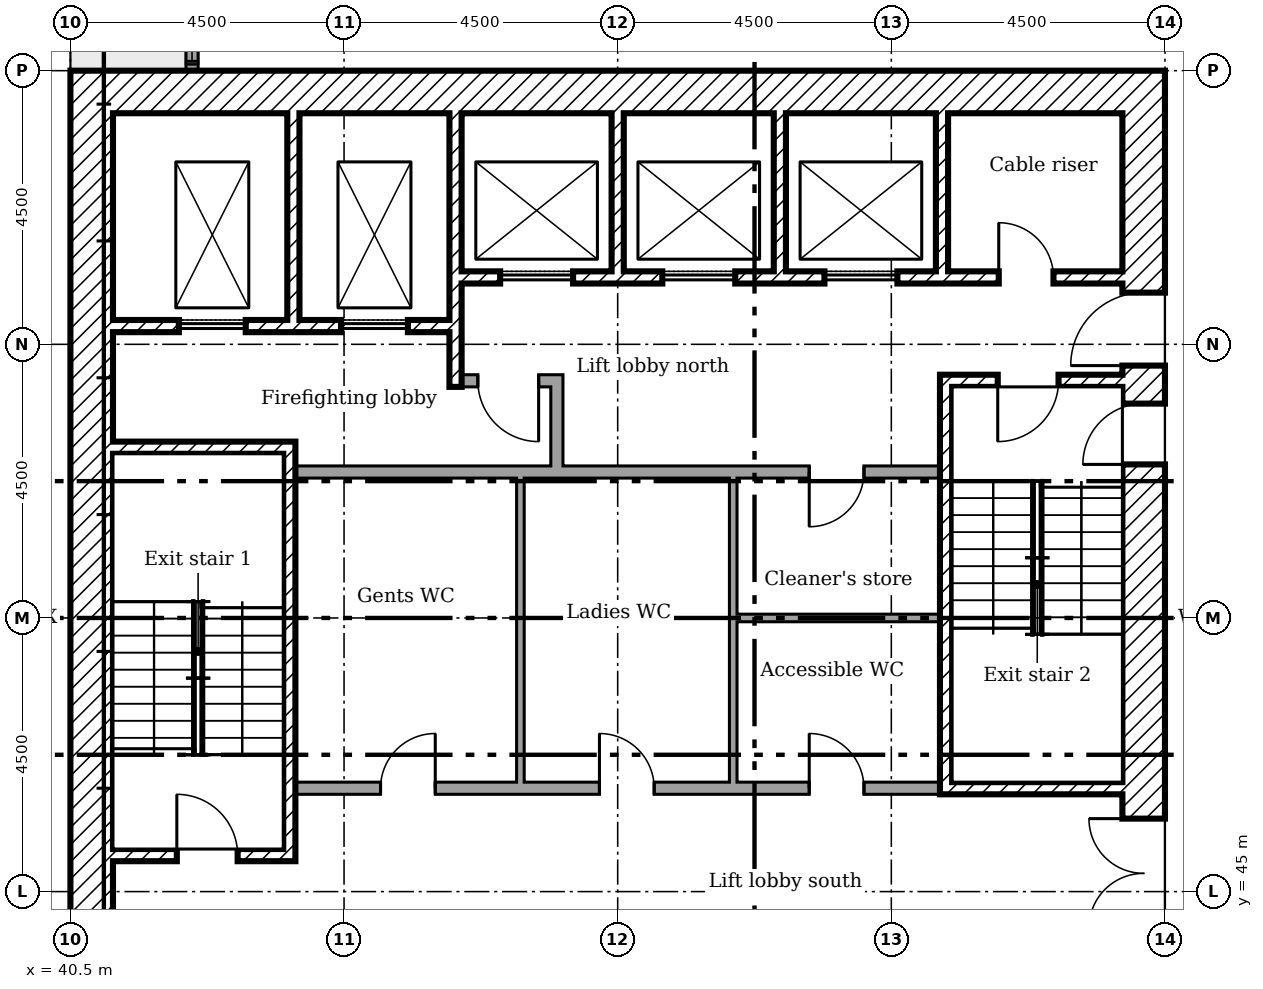
"""IFC4 building model, lengths in metres.
Left out: names, types, materials, properties, quantities, classifications, styles, units other than length and angle.
Written with IfcOpenShell. Run it as: python <this file> out.ifc"""

import sys

from ifc_helpers import new_model, si_unit, direction, frame, frame_2d, origin, place, context, subcontext, project, spatial, rectangle, extrude, element, fill, save


model = new_model("IFC4")
c1 = context("Model", 3, precision=1e-05, world=origin(), true_north=direction((0.0, 1.0)))
c2 = subcontext(c1, "Body", "Model", "MODEL_VIEW")
j1 = project(units=[si_unit("LENGTHUNIT", "METRE"), si_unit("PLANEANGLEUNIT", "RADIAN")], contexts=[c1])
p1 = place(None, origin())
s1 = spatial("IfcSite", under=j1, at=p1, CompositionType="ELEMENT")
p2 = place(p1, origin())
s2 = spatial("IfcBuilding", under=s1, at=p2, CompositionType="ELEMENT")
p3 = place(p2, frame((0.0, 0.0, 138.8)))
s3 = spatial("IfcBuildingStorey", under=s2, at=p3, CompositionType="ELEMENT", Elevation=138.8)
p4 = place(p3, frame((42.5, 69.9, 0.0), z_axis=(0.0, 0.0, 1.0), x_axis=(0.0, -1.0, 0.0)))
e1 = element("IfcWall", 1, at=p4, inside=s3, PredefinedType="ELEMENTEDWALL", context=c2, shape_type="SweptSolid", body=[
    extrude(rectangle(XDim=11.4, YDim=0.2, at=frame_2d((5.7, 0.0))), origin(), (0.0, 0.0, 1.0), 1.8),
])
p5 = place(p3, frame((58.15, 40.5, 0.0), z_axis=(0.0, 0.0, 1.0), x_axis=(0.0, 1.0, 0.0)))
e2 = element("IfcWall", 2, at=p5, inside=s3, PredefinedType="SHEAR", context=c2, shape_type="SweptSolid", body=[
    extrude(rectangle(XDim=18.0, YDim=0.7, at=frame_2d((9.0, 0.0))), origin(), (0.0, 0.0, 1.0), 4.75),
])
p6 = place(p5, frame((13.15, 0.0, 0.0)))
e3 = element("IfcOpeningElement", 3, at=p6, cuts=e2, PredefinedType="OPENING", context=c2, shape_type="SweptSolid", body=[
    extrude(rectangle(XDim=1.2, YDim=2.1, at=frame_2d((0.6, 1.05))), frame((0.0, 0.36, 0.0), z_axis=(0.0, -1.0, 0.0), x_axis=(1.0, 0.0, 0.0)), (0.0, 0.0, 1.0), 0.72),
])
p7 = place(p5, frame((3.9, 0.0, 0.0)))
e4 = element("IfcOpeningElement", 4, at=p7, cuts=e2, PredefinedType="OPENING", context=c2, shape_type="SweptSolid", body=[
    extrude(rectangle(XDim=1.8, YDim=2.1, at=frame_2d((0.9, 1.05))), frame((0.0, 0.36, 0.0), z_axis=(0.0, -1.0, 0.0), x_axis=(1.0, 0.0, 0.0)), (0.0, 0.0, 1.0), 0.72),
])
p8 = place(p5, frame((11.525, 0.0, 0.0)))
e5 = element("IfcOpeningElement", 5, at=p8, cuts=e2, PredefinedType="OPENING", context=c2, shape_type="SweptSolid", body=[
    extrude(rectangle(XDim=1.0, YDim=2.1, at=frame_2d((0.5, 1.05))), frame((0.0, 0.36, 0.0), z_axis=(0.0, -1.0, 0.0), x_axis=(1.0, 0.0, 0.0)), (0.0, 0.0, 1.0), 0.72),
])
p9 = place(p3, frame((41.2, 58.15, 0.0)))
e6 = element("IfcWall", 6, at=p9, inside=s3, PredefinedType="SHEAR", context=c2, shape_type="SweptSolid", body=[
    extrude(rectangle(XDim=16.6, YDim=0.7, at=frame_2d((8.3, 0.0))), origin(), (0.0, 0.0, 1.0), 4.75),
])
p10 = place(p3, frame((40.85, 40.5, 0.0), z_axis=(0.0, 0.0, 1.0), x_axis=(0.0, 1.0, 0.0)))
e7 = element("IfcWall", 7, at=p10, inside=s3, PredefinedType="SHEAR", context=c2, shape_type="SweptSolid", body=[
    extrude(rectangle(XDim=18.0, YDim=0.7, at=frame_2d((9.0, 0.0))), origin(), (0.0, 0.0, 1.0), 4.75),
])
p11 = place(p3, frame((44.167, 57.8, 0.0), z_axis=(0.0, 0.0, 1.0), x_axis=(0.0, -1.0, 0.0)))
e8 = element("IfcWall", 8, at=p11, inside=s3, PredefinedType="SHEAR", context=c2, shape_type="SweptSolid", body=[
    extrude(rectangle(XDim=3.4, YDim=0.2, at=frame_2d((1.7, 0.0))), origin(), (0.0, 0.0, 1.0), 4.75),
])
p12 = place(p3, frame((46.833, 57.8, 0.0), z_axis=(0.0, 0.0, 1.0), x_axis=(0.0, -1.0, 0.0)))
e9 = element("IfcWall", 9, at=p12, inside=s3, PredefinedType="SHEAR", context=c2, shape_type="SweptSolid", body=[
    extrude(rectangle(XDim=4.5, YDim=0.2, at=frame_2d((2.25, 0.0))), origin(), (0.0, 0.0, 1.0), 4.75),
])
for number, where, z_axis, x_axis in (
    (10, (49.5, 57.8, 0.0), (0.0, 0.0, 1.0), (0.0, -1.0, 0.0)),
    (11, (52.167, 57.8, 0.0), (0.0, 0.0, 1.0), (0.0, -1.0, 0.0)),
    (12, (54.833, 57.8, 0.0), (0.0, 0.0, 1.0), (0.0, -1.0, 0.0)),
):
    element("IfcWall", number, at=place(p3, frame(where, z_axis=z_axis, x_axis=x_axis)), inside=s3, PredefinedType="SHEAR", context=c2, shape_type="SweptSolid", body=[
        extrude(rectangle(XDim=2.6, YDim=0.2, at=frame_2d((1.3, 0.0))), origin(), (0.0, 0.0, 1.0), 4.75),
    ])
p13 = place(p3, frame((48.5, 51.9, 0.0), z_axis=(0.0, 0.0, 1.0), x_axis=(0.0, 1.0, 0.0)))
e13 = element("IfcWall", 13, at=p13, inside=s3, PredefinedType="PARTITIONING", context=c2, shape_type="SweptSolid", body=[
    extrude(rectangle(XDim=1.6, YDim=0.2, at=frame_2d((0.8, 0.0))), origin(), (0.0, 0.0, 1.0), 4.75),
])
p14 = place(p3, frame((46.933, 53.4, 0.0)))
e14 = element("IfcWall", 14, at=p14, inside=s3, PredefinedType="PARTITIONING", context=c2, shape_type="SweptSolid", body=[
    extrude(rectangle(XDim=1.467, YDim=0.2, at=frame_2d((0.733, 0.0))), origin(), (0.0, 0.0, 1.0), 4.75),
])
p15 = place(p14, frame((0.267, 0.0, 0.0)))
e15 = element("IfcOpeningElement", 15, at=p15, cuts=e14, PredefinedType="OPENING", context=c2, shape_type="SweptSolid", body=[
    extrude(rectangle(XDim=1.0, YDim=2.1, at=frame_2d((0.5, 1.05))), frame((0.0, 0.11, 0.0), z_axis=(0.0, -1.0, 0.0), x_axis=(1.0, 0.0, 0.0)), (0.0, 0.0, 1.0), 0.22),
])
p16 = place(p3, frame((46.933, 55.1, 0.0)))
e16 = element("IfcWall", 16, at=p16, inside=s3, PredefinedType="SHEAR", context=c2, shape_type="SweptSolid", body=[
    extrude(rectangle(XDim=10.867, YDim=0.2, at=frame_2d((5.433, 0.0))), origin(), (0.0, 0.0, 1.0), 4.75),
])
p17 = place(p16, frame((8.833, 0.0, 0.0)))
e17 = element("IfcOpeningElement", 17, at=p17, cuts=e16, PredefinedType="OPENING", context=c2, shape_type="SweptSolid", body=[
    extrude(rectangle(XDim=0.9, YDim=2.1, at=frame_2d((0.45, 1.05))), frame((0.0, 0.11, 0.0), z_axis=(0.0, -1.0, 0.0), x_axis=(1.0, 0.0, 0.0)), (0.0, 0.0, 1.0), 0.22),
])
p18 = place(p16, frame((0.633, 0.0, 0.0)))
e18 = element("IfcOpeningElement", 18, at=p18, cuts=e16, PredefinedType="OPENING", context=c2, shape_type="SweptSolid", body=[
    extrude(rectangle(XDim=1.2, YDim=2.1, at=frame_2d((0.6, 1.05))), frame((0.0, 0.11, 0.0), z_axis=(0.0, -1.0, 0.0), x_axis=(1.0, 0.0, 0.0)), (0.0, 0.0, 1.0), 0.22),
])
p19 = place(p16, frame((3.3, 0.0, 0.0)))
e19 = element("IfcOpeningElement", 19, at=p19, cuts=e16, PredefinedType="OPENING", context=c2, shape_type="SweptSolid", body=[
    extrude(rectangle(XDim=1.2, YDim=2.1, at=frame_2d((0.6, 1.05))), frame((0.0, 0.11, 0.0), z_axis=(0.0, -1.0, 0.0), x_axis=(1.0, 0.0, 0.0)), (0.0, 0.0, 1.0), 0.22),
])
p20 = place(p16, frame((5.967, 0.0, 0.0)))
e20 = element("IfcOpeningElement", 20, at=p20, cuts=e16, PredefinedType="OPENING", context=c2, shape_type="SweptSolid", body=[
    extrude(rectangle(XDim=1.2, YDim=2.1, at=frame_2d((0.6, 1.05))), frame((0.0, 0.11, 0.0), z_axis=(0.0, -1.0, 0.0), x_axis=(1.0, 0.0, 0.0)), (0.0, 0.0, 1.0), 0.22),
])
p21 = place(p3, frame((41.2, 54.3, 0.0)))
e21 = element("IfcWall", 21, at=p21, inside=s3, PredefinedType="SHEAR", context=c2, shape_type="SweptSolid", body=[
    extrude(rectangle(XDim=5.533, YDim=0.2, at=frame_2d((2.767, 0.0))), origin(), (0.0, 0.0, 1.0), 4.75),
])
p22 = place(p21, frame((1.083, 0.0, 0.0)))
e22 = element("IfcOpeningElement", 22, at=p22, cuts=e21, PredefinedType="OPENING", context=c2, shape_type="SweptSolid", body=[
    extrude(rectangle(XDim=1.1, YDim=2.1, at=frame_2d((0.55, 1.05))), frame((0.0, 0.11, 0.0), z_axis=(0.0, -1.0, 0.0), x_axis=(1.0, 0.0, 0.0)), (0.0, 0.0, 1.0), 0.22),
])
p23 = place(p21, frame((3.75, 0.0, 0.0)))
e23 = element("IfcOpeningElement", 23, at=p23, cuts=e21, PredefinedType="OPENING", context=c2, shape_type="SweptSolid", body=[
    extrude(rectangle(XDim=1.1, YDim=2.1, at=frame_2d((0.55, 1.05))), frame((0.0, 0.11, 0.0), z_axis=(0.0, -1.0, 0.0), x_axis=(1.0, 0.0, 0.0)), (0.0, 0.0, 1.0), 0.22),
])
p24 = place(p3, frame((44.1, 45.5, 0.0), z_axis=(0.0, 0.0, 1.0), x_axis=(0.0, 1.0, 0.0)))
e24 = element("IfcWall", 24, at=p24, inside=s3, PredefinedType="SHEAR", context=c2, shape_type="SweptSolid", body=[
    extrude(rectangle(XDim=6.9, YDim=0.2, at=frame_2d((3.45, 0.0))), origin(), (0.0, 0.0, 1.0), 4.75),
])
p25 = place(p3, frame((41.2, 52.3, 0.0)))
e25 = element("IfcWall", 25, at=p25, inside=s3, PredefinedType="SHEAR", context=c2, shape_type="SweptSolid", body=[
    extrude(rectangle(XDim=2.8, YDim=0.2, at=frame_2d((1.4, 0.0))), origin(), (0.0, 0.0, 1.0), 4.75),
])
p26 = place(p3, frame((41.2, 45.6, 0.0)))
e26 = element("IfcWall", 26, at=p26, inside=s3, PredefinedType="SHEAR", context=c2, shape_type="SweptSolid", body=[
    extrude(rectangle(XDim=2.8, YDim=0.2, at=frame_2d((1.4, 0.0))), origin(), (0.0, 0.0, 1.0), 4.75),
])
p27 = place(p26, frame((1.05, 0.0, 0.0)))
e27 = element("IfcOpeningElement", 27, at=p27, cuts=e26, PredefinedType="OPENING", context=c2, shape_type="SweptSolid", body=[
    extrude(rectangle(XDim=1.0, YDim=2.1, at=frame_2d((0.5, 1.05))), frame((0.0, 0.11, 0.0), z_axis=(0.0, -1.0, 0.0), x_axis=(1.0, 0.0, 0.0)), (0.0, 0.0, 1.0), 0.22),
])
p28 = place(p3, frame((54.8, 53.4, 0.0)))
e28 = element("IfcWall", 28, at=p28, inside=s3, PredefinedType="SHEAR", context=c2, shape_type="SweptSolid", body=[
    extrude(rectangle(XDim=3.0, YDim=0.2, at=frame_2d((1.5, 0.0))), origin(), (0.0, 0.0, 1.0), 4.75),
])
p29 = place(p28, frame((0.95, 0.0, 0.0)))
e29 = element("IfcOpeningElement", 29, at=p29, cuts=e28, PredefinedType="OPENING", context=c2, shape_type="SweptSolid", body=[
    extrude(rectangle(XDim=1.0, YDim=2.1, at=frame_2d((0.5, 1.05))), frame((0.0, 0.11, 0.0), z_axis=(0.0, -1.0, 0.0), x_axis=(1.0, 0.0, 0.0)), (0.0, 0.0, 1.0), 0.22),
])
p30 = place(p3, frame((54.8, 46.7, 0.0)))
e30 = element("IfcWall", 30, at=p30, inside=s3, PredefinedType="SHEAR", context=c2, shape_type="SweptSolid", body=[
    extrude(rectangle(XDim=3.0, YDim=0.2, at=frame_2d((1.5, 0.0))), origin(), (0.0, 0.0, 1.0), 4.75),
])
p31 = place(p3, frame((54.9, 46.8, 0.0), z_axis=(0.0, 0.0, 1.0), x_axis=(0.0, 1.0, 0.0)))
e31 = element("IfcWall", 31, at=p31, inside=s3, PredefinedType="SHEAR", context=c2, shape_type="SweptSolid", body=[
    extrude(rectangle(XDim=6.5, YDim=0.2, at=frame_2d((3.25, 0.0))), origin(), (0.0, 0.0, 1.0), 4.75),
])
p32 = place(p3, frame((44.2, 51.9, 0.0)))
e32 = element("IfcWall", 32, at=p32, inside=s3, PredefinedType="PARTITIONING", context=c2, shape_type="SweptSolid", body=[
    extrude(rectangle(XDim=10.6, YDim=0.2, at=frame_2d((5.3, 0.0))), origin(), (0.0, 0.0, 1.0), 4.75),
])
p33 = place(p32, frame((8.45, 0.0, 0.0)))
e33 = element("IfcOpeningElement", 33, at=p33, cuts=e32, PredefinedType="OPENING", context=c2, shape_type="SweptSolid", body=[
    extrude(rectangle(XDim=0.9, YDim=2.1, at=frame_2d((0.45, 1.05))), frame((0.0, 0.11, 0.0), z_axis=(0.0, -1.0, 0.0), x_axis=(1.0, 0.0, 0.0)), (0.0, 0.0, 1.0), 0.22),
])
p34 = place(p3, frame((44.2, 46.7, 0.0)))
e34 = element("IfcWall", 34, at=p34, inside=s3, PredefinedType="PARTITIONING", context=c2, shape_type="SweptSolid", body=[
    extrude(rectangle(XDim=10.6, YDim=0.2, at=frame_2d((5.3, 0.0))), origin(), (0.0, 0.0, 1.0), 4.75),
])
p35 = place(p34, frame((1.4, 0.0, 0.0)))
e35 = element("IfcOpeningElement", 35, at=p35, cuts=e34, PredefinedType="OPENING", context=c2, shape_type="SweptSolid", body=[
    extrude(rectangle(XDim=0.9, YDim=2.1, at=frame_2d((0.45, 1.05))), frame((0.0, 0.11, 0.0), z_axis=(0.0, -1.0, 0.0), x_axis=(1.0, 0.0, 0.0)), (0.0, 0.0, 1.0), 0.22),
])
p36 = place(p34, frame((5.0, 0.0, 0.0)))
e36 = element("IfcOpeningElement", 36, at=p36, cuts=e34, PredefinedType="OPENING", context=c2, shape_type="SweptSolid", body=[
    extrude(rectangle(XDim=0.9, YDim=2.1, at=frame_2d((0.45, 1.05))), frame((0.0, 0.11, 0.0), z_axis=(0.0, -1.0, 0.0), x_axis=(1.0, 0.0, 0.0)), (0.0, 0.0, 1.0), 0.22),
])
p37 = place(p34, frame((8.45, 0.0, 0.0)))
e37 = element("IfcOpeningElement", 37, at=p37, cuts=e34, PredefinedType="OPENING", context=c2, shape_type="SweptSolid", body=[
    extrude(rectangle(XDim=0.9, YDim=2.1, at=frame_2d((0.45, 1.05))), frame((0.0, 0.11, 0.0), z_axis=(0.0, -1.0, 0.0), x_axis=(1.0, 0.0, 0.0)), (0.0, 0.0, 1.0), 0.22),
])
p38 = place(p3, frame((47.9, 46.8, 0.0), z_axis=(0.0, 0.0, 1.0), x_axis=(0.0, 1.0, 0.0)))
e38 = element("IfcWall", 38, at=p38, inside=s3, PredefinedType="PARTITIONING", context=c2, shape_type="SweptSolid", body=[
    extrude(rectangle(XDim=5.0, YDim=0.125, at=frame_2d((2.5, 0.0))), origin(), (0.0, 0.0, 1.0), 4.75),
])
p39 = place(p3, frame((51.4, 46.8, 0.0), z_axis=(0.0, 0.0, 1.0), x_axis=(0.0, 1.0, 0.0)))
e39 = element("IfcWall", 39, at=p39, inside=s3, PredefinedType="PARTITIONING", context=c2, shape_type="SweptSolid", body=[
    extrude(rectangle(XDim=2.762, YDim=0.125, at=frame_2d((1.381, 0.0))), origin(), (0.0, 0.0, 1.0), 4.75),
])
p40 = place(p3, frame((54.8, 49.5, 0.0), z_axis=(0.0, 0.0, 1.0), x_axis=(-1.0, 0.0, 0.0)))
e40 = element("IfcWall", 40, at=p40, inside=s3, PredefinedType="PARTITIONING", context=c2, shape_type="SweptSolid", body=[
    extrude(rectangle(XDim=3.338, YDim=0.125, at=frame_2d((1.669, 0.0))), origin(), (0.0, 0.0, 1.0), 4.75),
])
p41 = place(p3, frame((51.4, 49.5, 0.0), z_axis=(0.0, 0.0, 1.0), x_axis=(0.0, 1.0, 0.0)))
e41 = element("IfcWall", 41, at=p41, inside=s3, PredefinedType="PARTITIONING", context=c2, shape_type="SweptSolid", body=[
    extrude(rectangle(XDim=2.3, YDim=0.125, at=frame_2d((1.15, 0.0))), origin(), (0.0, 0.0, 1.0), 4.75),
])
p42 = place(p6, origin())
e42 = element("IfcDoor", 42, at=p42, inside=s3, OperationType="SINGLE_SWING_RIGHT", PredefinedType="DOOR", context=c2, shape_type="SweptSolid", body=[
    extrude(rectangle(XDim=1.2, YDim=2.1, at=frame_2d((0.6, 1.05))), frame((0.0, 0.025, 0.0), z_axis=(0.0, -1.0, 0.0), x_axis=(1.0, 0.0, 0.0)), (0.0, 0.0, 1.0), 0.05),
])
fill(e3, e42)
p43 = place(p7, origin())
e43 = element("IfcDoor", 43, at=p43, inside=s3, OperationType="DOUBLE_DOOR_SINGLE_SWING", PredefinedType="DOOR", context=c2, shape_type="SweptSolid", body=[
    extrude(rectangle(XDim=1.8, YDim=2.1, at=frame_2d((0.9, 1.05))), frame((0.0, 0.025, 0.0), z_axis=(0.0, -1.0, 0.0), x_axis=(1.0, 0.0, 0.0)), (0.0, 0.0, 1.0), 0.05),
])
fill(e4, e43)
p44 = place(p27, origin())
e44 = element("IfcDoor", 44, at=p44, inside=s3, OperationType="SINGLE_SWING_RIGHT", PredefinedType="DOOR", context=c2, shape_type="SweptSolid", body=[
    extrude(rectangle(XDim=1.0, YDim=2.1, at=frame_2d((0.5, 1.05))), frame((0.0, 0.025, 0.0), z_axis=(0.0, -1.0, 0.0), x_axis=(1.0, 0.0, 0.0)), (0.0, 0.0, 1.0), 0.05),
])
fill(e27, e44)
p45 = place(p29, frame((1.0, 0.0, 0.0), x_axis=(-1.0, 0.0, 0.0)))
e45 = element("IfcDoor", 45, at=p45, inside=s3, OperationType="SINGLE_SWING_LEFT", PredefinedType="DOOR", context=c2, shape_type="SweptSolid", body=[
    extrude(rectangle(XDim=1.0, YDim=2.1, at=frame_2d((0.5, 1.05))), frame((0.0, 0.025, 0.0), z_axis=(0.0, -1.0, 0.0), x_axis=(1.0, 0.0, 0.0)), (0.0, 0.0, 1.0), 0.05),
])
fill(e29, e45)
p46 = place(p8, origin())
e46 = element("IfcDoor", 46, at=p46, inside=s3, OperationType="SINGLE_SWING_RIGHT", PredefinedType="DOOR", context=c2, shape_type="SweptSolid", body=[
    extrude(rectangle(XDim=1.0, YDim=2.1, at=frame_2d((0.5, 1.05))), frame((0.0, 0.025, 0.0), z_axis=(0.0, -1.0, 0.0), x_axis=(1.0, 0.0, 0.0)), (0.0, 0.0, 1.0), 0.05),
])
fill(e5, e46)
p47 = place(p15, frame((1.0, 0.0, 0.0), x_axis=(-1.0, 0.0, 0.0)))
e47 = element("IfcDoor", 47, at=p47, inside=s3, OperationType="SINGLE_SWING_RIGHT", PredefinedType="DOOR", context=c2, shape_type="SweptSolid", body=[
    extrude(rectangle(XDim=1.0, YDim=2.1, at=frame_2d((0.5, 1.05))), frame((0.0, 0.025, 0.0), z_axis=(0.0, -1.0, 0.0), x_axis=(1.0, 0.0, 0.0)), (0.0, 0.0, 1.0), 0.05),
])
fill(e15, e47)
p48 = place(p17, origin())
e48 = element("IfcDoor", 48, at=p48, inside=s3, OperationType="SINGLE_SWING_RIGHT", PredefinedType="DOOR", context=c2, shape_type="SweptSolid", body=[
    extrude(rectangle(XDim=0.9, YDim=2.1, at=frame_2d((0.45, 1.05))), frame((0.0, 0.025, 0.0), z_axis=(0.0, -1.0, 0.0), x_axis=(1.0, 0.0, 0.0)), (0.0, 0.0, 1.0), 0.05),
])
fill(e17, e48)
p49 = place(p35, origin())
e49 = element("IfcDoor", 49, at=p49, inside=s3, OperationType="SINGLE_SWING_LEFT", PredefinedType="DOOR", context=c2, shape_type="SweptSolid", body=[
    extrude(rectangle(XDim=0.9, YDim=2.1, at=frame_2d((0.45, 1.05))), frame((0.0, 0.025, 0.0), z_axis=(0.0, -1.0, 0.0), x_axis=(1.0, 0.0, 0.0)), (0.0, 0.0, 1.0), 0.05),
])
fill(e35, e49)
p50 = place(p36, origin())
e50 = element("IfcDoor", 50, at=p50, inside=s3, OperationType="SINGLE_SWING_RIGHT", PredefinedType="DOOR", context=c2, shape_type="SweptSolid", body=[
    extrude(rectangle(XDim=0.9, YDim=2.1, at=frame_2d((0.45, 1.05))), frame((0.0, 0.025, 0.0), z_axis=(0.0, -1.0, 0.0), x_axis=(1.0, 0.0, 0.0)), (0.0, 0.0, 1.0), 0.05),
])
fill(e36, e50)
p51 = place(p37, origin())
e51 = element("IfcDoor", 51, at=p51, inside=s3, OperationType="SINGLE_SWING_RIGHT", PredefinedType="DOOR", context=c2, shape_type="SweptSolid", body=[
    extrude(rectangle(XDim=0.9, YDim=2.1, at=frame_2d((0.45, 1.05))), frame((0.0, 0.025, 0.0), z_axis=(0.0, -1.0, 0.0), x_axis=(1.0, 0.0, 0.0)), (0.0, 0.0, 1.0), 0.05),
])
fill(e37, e51)
p52 = place(p33, frame((0.9, 0.0, 0.0), x_axis=(-1.0, 0.0, 0.0)))
e52 = element("IfcDoor", 52, at=p52, inside=s3, OperationType="SINGLE_SWING_LEFT", PredefinedType="DOOR", context=c2, shape_type="SweptSolid", body=[
    extrude(rectangle(XDim=0.9, YDim=2.1, at=frame_2d((0.45, 1.05))), frame((0.0, 0.025, 0.0), z_axis=(0.0, -1.0, 0.0), x_axis=(1.0, 0.0, 0.0)), (0.0, 0.0, 1.0), 0.05),
])
fill(e33, e52)
p53 = place(p22, origin())
e53 = element("IfcDoor", 53, at=p53, inside=s3, OperationType="SLIDING_TO_LEFT", PredefinedType="DOOR", context=c2, shape_type="SweptSolid", body=[
    extrude(rectangle(XDim=1.1, YDim=2.1, at=frame_2d((0.55, 1.05))), frame((0.0, 0.025, 0.0), z_axis=(0.0, -1.0, 0.0), x_axis=(1.0, 0.0, 0.0)), (0.0, 0.0, 1.0), 0.05),
])
fill(e22, e53)
p54 = place(p23, origin())
e54 = element("IfcDoor", 54, at=p54, inside=s3, OperationType="SLIDING_TO_LEFT", PredefinedType="DOOR", context=c2, shape_type="SweptSolid", body=[
    extrude(rectangle(XDim=1.1, YDim=2.1, at=frame_2d((0.55, 1.05))), frame((0.0, 0.025, 0.0), z_axis=(0.0, -1.0, 0.0), x_axis=(1.0, 0.0, 0.0)), (0.0, 0.0, 1.0), 0.05),
])
fill(e23, e54)
p55 = place(p18, origin())
e55 = element("IfcDoor", 55, at=p55, inside=s3, OperationType="SLIDING_TO_LEFT", PredefinedType="DOOR", context=c2, shape_type="SweptSolid", body=[
    extrude(rectangle(XDim=1.2, YDim=2.1, at=frame_2d((0.6, 1.05))), frame((0.0, 0.025, 0.0), z_axis=(0.0, -1.0, 0.0), x_axis=(1.0, 0.0, 0.0)), (0.0, 0.0, 1.0), 0.05),
])
fill(e18, e55)
p56 = place(p19, origin())
e56 = element("IfcDoor", 56, at=p56, inside=s3, OperationType="SLIDING_TO_LEFT", PredefinedType="DOOR", context=c2, shape_type="SweptSolid", body=[
    extrude(rectangle(XDim=1.2, YDim=2.1, at=frame_2d((0.6, 1.05))), frame((0.0, 0.025, 0.0), z_axis=(0.0, -1.0, 0.0), x_axis=(1.0, 0.0, 0.0)), (0.0, 0.0, 1.0), 0.05),
])
fill(e19, e56)
p57 = place(p20, origin())
e57 = element("IfcDoor", 57, at=p57, inside=s3, OperationType="SLIDING_TO_LEFT", PredefinedType="DOOR", context=c2, shape_type="SweptSolid", body=[
    extrude(rectangle(XDim=1.2, YDim=2.1, at=frame_2d((0.6, 1.05))), frame((0.0, 0.025, 0.0), z_axis=(0.0, -1.0, 0.0), x_axis=(1.0, 0.0, 0.0)), (0.0, 0.0, 1.0), 0.05),
])
fill(e20, e57)
save(model, sys.argv[1])
